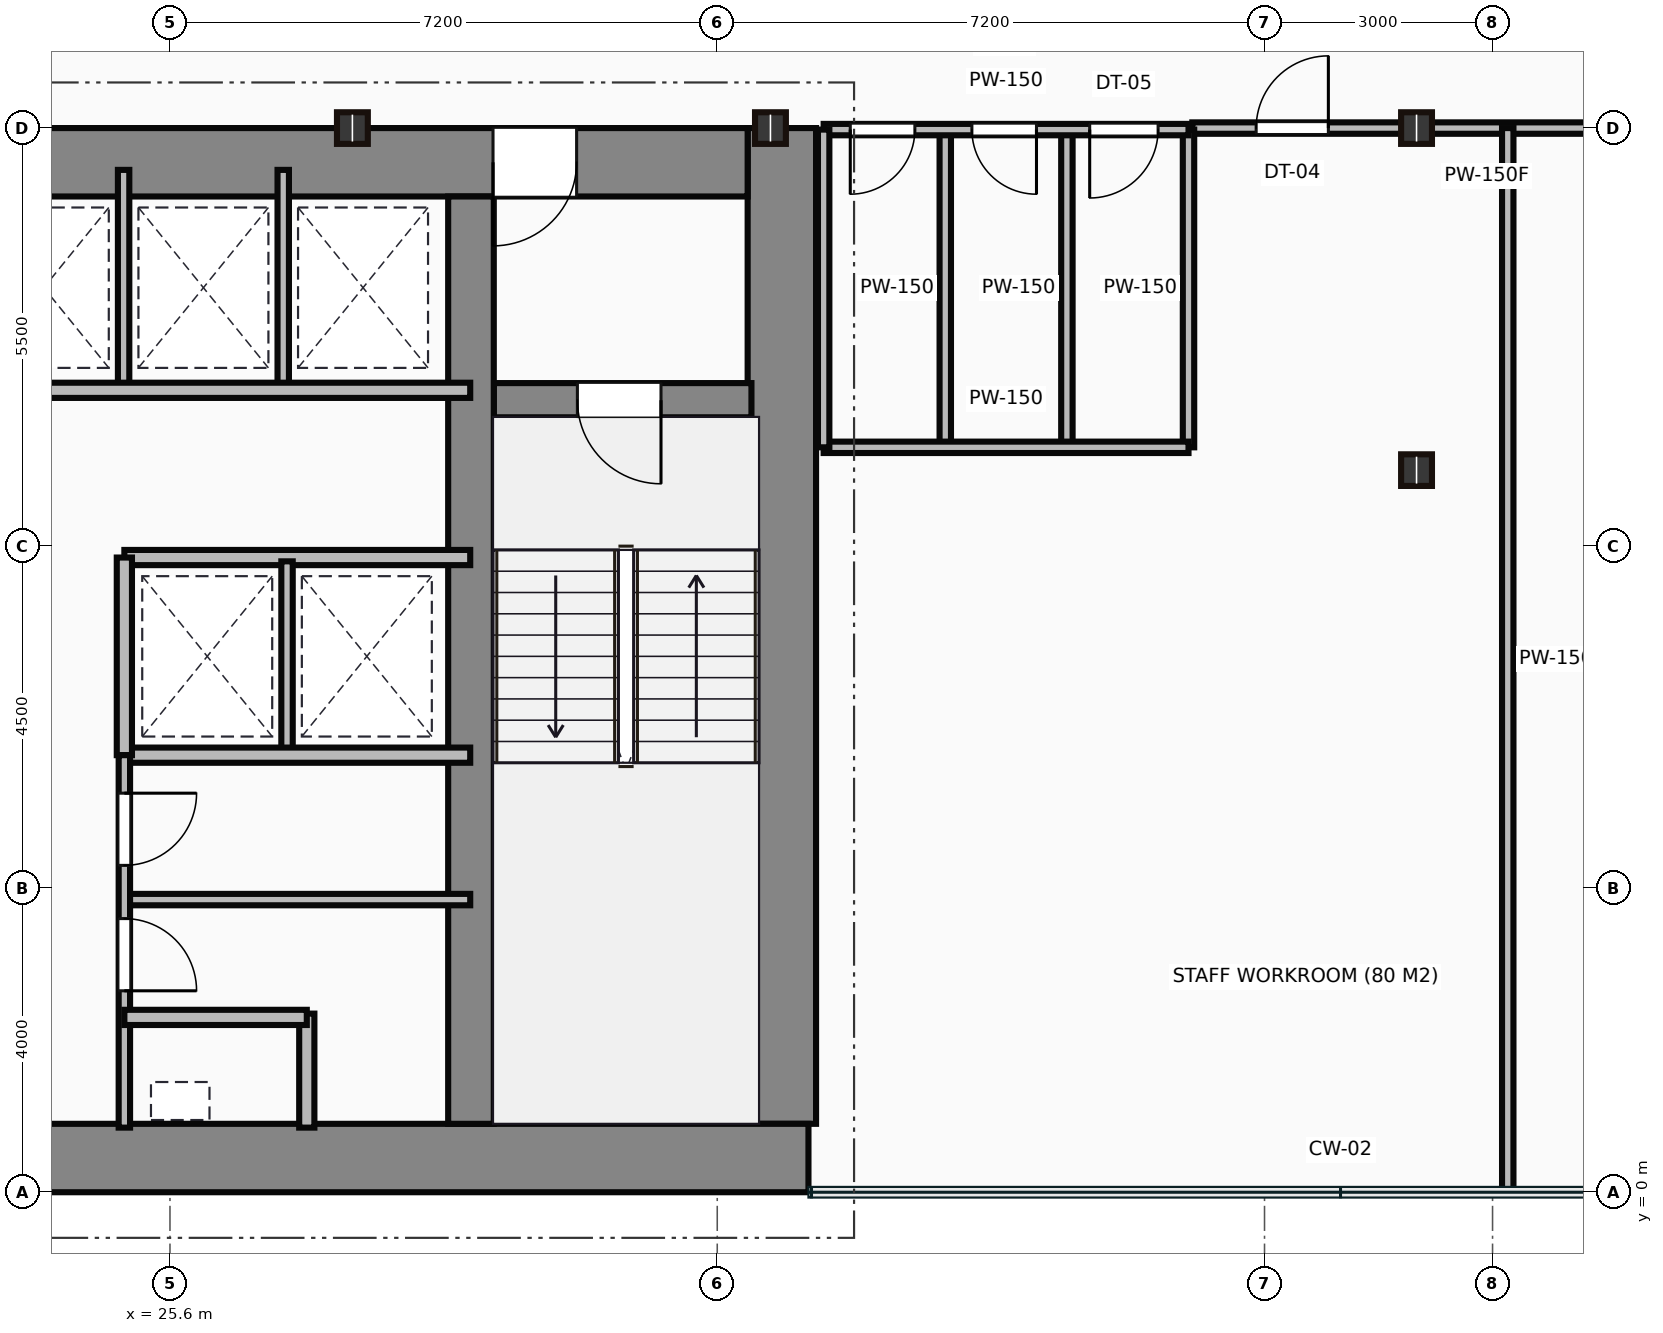
"""IFC4 building model, lengths in metres.
Left out: names, types, materials, properties, quantities, classifications, styles, units other than length and angle.
Written with IfcOpenShell. Run it as: python <this file> out.ifc"""

import sys

from ifc_helpers import new_model, si_unit, direction, frame, frame_2d, origin, origin_2d, place, context, subcontext, project, spatial, rectangle, i_section, extrude, source, transform, mapped, element, fill, save


model = new_model("IFC4")
c1 = context("Model", 3, precision=1e-05, world=origin(), true_north=direction((0.0, 1.0)))
c2 = subcontext(c1, "Body", "Model", "MODEL_VIEW")
j1 = project(units=[si_unit("LENGTHUNIT", "METRE"), si_unit("PLANEANGLEUNIT", "RADIAN")], contexts=[c1])
p1 = place(None, origin())
s1 = spatial("IfcSite", under=j1, at=p1, CompositionType="ELEMENT")
p2 = place(p1, origin())
s2 = spatial("IfcBuilding", under=s1, at=p2, CompositionType="ELEMENT")
p3 = place(p2, frame((0.0, 0.0, 76.3)))
s3 = spatial("IfcBuildingStorey", under=s2, at=p3, CompositionType="ELEMENT", Elevation=76.3)
m1 = source(origin(), c2, "Body", "SweptSolid", [
    extrude(rectangle(XDim=29.5, YDim=0.9, at=frame_2d((14.75, 0.0))), origin(), (0.0, 0.0, 1.0), 3.65),
])
p4 = place(p3, frame((4.5, 0.45, 0.0), z_axis=(0.0, 0.0, 1.0), x_axis=(1.0, 0.0, 0.0)))
e1 = element("IfcWall", 1, at=p4, inside=s3, PredefinedType="SHEAR", context=c2, shape_type="MappedRepresentation", body=[
    mapped(m1, transform((0.0, 0.0, 0.0))),
])
m2 = source(origin(), c2, "Body", "SweptSolid", [
    extrude(rectangle(XDim=13.1, YDim=0.9, at=frame_2d((6.55, 0.0))), origin(), (0.0, 0.0, 1.0), 3.65),
])
p5 = place(p3, frame((33.65, 0.9, 0.0), z_axis=(0.0, 0.0, 1.0), x_axis=(0.0, 1.0, 0.0)))
e2 = element("IfcWall", 2, at=p5, inside=s3, PredefinedType="SHEAR", context=c2, shape_type="MappedRepresentation", body=[
    mapped(m2, transform((0.0, 0.0, 0.0))),
])
m3 = source(origin(), c2, "Body", "SweptSolid", [
    extrude(rectangle(XDim=12.6, YDim=0.9, at=frame_2d((6.3, 0.0))), origin(), (0.0, 0.0, 1.0), 3.65),
])
p6 = place(p3, frame((20.6, 13.55, 0.0), z_axis=(0.0, 0.0, 1.0), x_axis=(1.0, 0.0, 0.0)))
e3 = element("IfcWall", 3, at=p6, inside=s3, PredefinedType="SHEAR", context=c2, shape_type="MappedRepresentation", body=[
    mapped(m3, transform((0.0, 0.0, 0.0))),
])
p7 = place(p6, frame((9.25, 0.0, 0.0)))
e4 = element("IfcOpeningElement", 4, at=p7, cuts=e3, PredefinedType="OPENING", context=c2, shape_type="SweptSolid", body=[
    extrude(rectangle(XDim=1.1, YDim=2.15, at=frame_2d((0.55, 1.075))), frame((0.0, 0.46, 0.0), z_axis=(0.0, -1.0, 0.0), x_axis=(1.0, 0.0, 0.0)), (0.0, 0.0, 1.0), 0.92),
])
m4 = source(origin(), c2, "Body", "SweptSolid", [
    extrude(rectangle(XDim=12.2, YDim=0.6, at=frame_2d((6.1, 0.0))), origin(), (0.0, 0.0, 1.0), 3.65),
])
p8 = place(p3, frame((29.56, 0.9, 0.0), z_axis=(0.0, 0.0, 1.0), x_axis=(0.0, 1.0, 0.0)))
e5 = element("IfcWall", 5, at=p8, inside=s3, PredefinedType="SHEAR", context=c2, shape_type="MappedRepresentation", body=[
    mapped(m4, transform((0.0, 0.0, 0.0))),
])
m5 = source(origin(), c2, "Body", "SweptSolid", [
    extrude(rectangle(XDim=3.39, YDim=0.45, at=frame_2d((1.695, 0.0))), origin(), (0.0, 0.0, 1.0), 3.65),
])
p9 = place(p3, frame((29.86, 10.42, 0.0), z_axis=(0.0, 0.0, 1.0), x_axis=(1.0, 0.0, 0.0)))
e6 = element("IfcWall", 6, at=p9, inside=s3, PredefinedType="SHEAR", context=c2, shape_type="MappedRepresentation", body=[
    mapped(m5, transform((0.0, 0.0, 0.0))),
])
p10 = place(p9, frame((1.1, 0.0, 0.0)))
e7 = element("IfcOpeningElement", 7, at=p10, cuts=e6, PredefinedType="OPENING", context=c2, shape_type="SweptSolid", body=[
    extrude(rectangle(XDim=1.1, YDim=2.15, at=frame_2d((0.55, 1.075))), frame((0.0, 0.235, 0.0), z_axis=(0.0, -1.0, 0.0), x_axis=(1.0, 0.0, 0.0)), (0.0, 0.0, 1.0), 0.47),
])
m6 = source(origin(), c2, "Body", "SweptSolid", [
    extrude(i_section(OverallWidth=0.406, OverallDepth=0.416, WebThickness=0.03, FlangeThickness=0.048, at=origin_2d()), origin(), (0.0, 0.0, 1.0), 3.65),
])
for number, where, z_axis, x_axis in (
    (8, (28.0, 14.0, 0.0), (0.0, 0.0, 1.0), (1.0, 0.0, 0.0)),
    (9, (33.5, 14.0, 0.0), (0.0, 0.0, 1.0), (1.0, 0.0, 0.0)),
    (10, (42.0, 9.5, 0.0), (0.0, 0.0, 1.0), (1.0, 0.0, 0.0)),
    (11, (42.0, 14.0, 0.0), (0.0, 0.0, 1.0), (1.0, 0.0, 0.0)),
):
    element("IfcColumn", number, at=place(p3, frame(where, z_axis=z_axis, x_axis=x_axis)), inside=s3, PredefinedType="COLUMN", context=c2, shape_type="MappedRepresentation", body=[
        mapped(m6, transform((0.0, 0.0, 0.0))),
    ])
m7 = source(origin(), c2, "Body", "SweptSolid", [
    extrude(rectangle(XDim=8.8, YDim=0.2, at=frame_2d((4.4, 0.0))), origin(), (0.0, 0.0, 1.0), 3.4),
])
p11 = place(p3, frame((20.75, 10.55, 0.0), z_axis=(0.0, 0.0, 1.0), x_axis=(1.0, 0.0, 0.0)))
e12 = element("IfcWall", 12, at=p11, inside=s3, PredefinedType="PARTITIONING", context=c2, shape_type="MappedRepresentation", body=[
    mapped(m7, transform((0.0, 0.0, 0.0))),
])
m8 = source(origin(), c2, "Body", "SweptSolid", [
    extrude(rectangle(XDim=2.85, YDim=0.15, at=frame_2d((1.425, 0.0))), origin(), (0.0, 0.0, 1.0), 3.4),
])
for number, where, z_axis, x_axis in (
    (13, (24.99, 10.6, 0.0), (0.0, 0.0, 1.0), (0.0, 1.0, 0.0)),
    (14, (27.09, 10.6, 0.0), (0.0, 0.0, 1.0), (0.0, 1.0, 0.0)),
):
    element("IfcWall", number, at=place(p3, frame(where, z_axis=z_axis, x_axis=x_axis)), inside=s3, PredefinedType="PARTITIONING", context=c2, shape_type="MappedRepresentation", body=[
        mapped(m8, transform((0.0, 0.0, 0.0))),
    ])
m9 = source(origin(), c2, "Body", "SweptSolid", [
    extrude(rectangle(XDim=4.55, YDim=0.2, at=frame_2d((2.275, 0.0))), origin(), (0.0, 0.0, 1.0), 3.4),
])
for number, where, z_axis, x_axis in (
    (15, (25.0, 8.35, 0.0), (0.0, 0.0, 1.0), (1.0, 0.0, 0.0)),
    (16, (25.0, 5.75, 0.0), (0.0, 0.0, 1.0), (1.0, 0.0, 0.0)),
):
    element("IfcWall", number, at=place(p3, frame(where, z_axis=z_axis, x_axis=x_axis)), inside=s3, PredefinedType="PARTITIONING", context=c2, shape_type="MappedRepresentation", body=[
        mapped(m9, transform((0.0, 0.0, 0.0))),
    ])
m10 = source(origin(), c2, "Body", "SweptSolid", [
    extrude(rectangle(XDim=2.6, YDim=0.2, at=frame_2d((1.3, 0.0))), origin(), (0.0, 0.0, 1.0), 3.4),
])
p12 = place(p3, frame((25.0, 5.75, 0.0), z_axis=(0.0, 0.0, 1.0), x_axis=(0.0, 1.0, 0.0)))
e17 = element("IfcWall", 17, at=p12, inside=s3, PredefinedType="PARTITIONING", context=c2, shape_type="MappedRepresentation", body=[
    mapped(m10, transform((0.0, 0.0, 0.0))),
])
m11 = source(origin(), c2, "Body", "SweptSolid", [
    extrude(rectangle(XDim=2.5, YDim=0.15, at=frame_2d((1.25, 0.0))), origin(), (0.0, 0.0, 1.0), 3.4),
])
p13 = place(p3, frame((27.14, 5.8, 0.0), z_axis=(0.0, 0.0, 1.0), x_axis=(0.0, 1.0, 0.0)))
e18 = element("IfcWall", 18, at=p13, inside=s3, PredefinedType="PARTITIONING", context=c2, shape_type="MappedRepresentation", body=[
    mapped(m11, transform((0.0, 0.0, 0.0))),
])
m12 = source(origin(), c2, "Body", "SweptSolid", [
    extrude(rectangle(XDim=4.9, YDim=0.15, at=frame_2d((2.45, 0.0))), origin(), (0.0, 0.0, 1.0), 3.4),
])
p14 = place(p3, frame((25.0, 0.85, 0.0), z_axis=(0.0, 0.0, 1.0), x_axis=(0.0, 1.0, 0.0)))
e19 = element("IfcWall", 19, at=p14, inside=s3, PredefinedType="PARTITIONING", context=c2, shape_type="MappedRepresentation", body=[
    mapped(m12, transform((0.0, 0.0, 0.0))),
])
p15 = place(p14, frame((1.8, 0.0, 0.0)))
e20 = element("IfcOpeningElement", 20, at=p15, cuts=e19, PredefinedType="OPENING", context=c2, shape_type="SweptSolid", body=[
    extrude(rectangle(XDim=0.95, YDim=2.15, at=frame_2d((0.475, 1.075))), frame((0.0, 0.085, 0.0), z_axis=(0.0, -1.0, 0.0), x_axis=(1.0, 0.0, 0.0)), (0.0, 0.0, 1.0), 0.17),
])
p16 = place(p14, frame((3.45, 0.0, 0.0)))
e21 = element("IfcOpeningElement", 21, at=p16, cuts=e19, PredefinedType="OPENING", context=c2, shape_type="SweptSolid", body=[
    extrude(rectangle(XDim=0.95, YDim=2.15, at=frame_2d((0.475, 1.075))), frame((0.0, 0.085, 0.0), z_axis=(0.0, -1.0, 0.0), x_axis=(1.0, 0.0, 0.0)), (0.0, 0.0, 1.0), 0.17),
])
m13 = source(origin(), c2, "Body", "SweptSolid", [
    extrude(rectangle(XDim=2.4, YDim=0.2, at=frame_2d((1.2, 0.0))), origin(), (0.0, 0.0, 1.0), 3.4),
])
p17 = place(p3, frame((25.0, 2.3, 0.0), z_axis=(0.0, 0.0, 1.0), x_axis=(1.0, 0.0, 0.0)))
e22 = element("IfcWall", 22, at=p17, inside=s3, PredefinedType="PARTITIONING", context=c2, shape_type="MappedRepresentation", body=[
    mapped(m13, transform((0.0, 0.0, 0.0))),
])
m14 = source(origin(), c2, "Body", "SweptSolid", [
    extrude(rectangle(XDim=1.5, YDim=0.2, at=frame_2d((0.75, 0.0))), origin(), (0.0, 0.0, 1.0), 3.4),
])
p18 = place(p3, frame((27.4, 0.85, 0.0), z_axis=(0.0, 0.0, 1.0), x_axis=(0.0, 1.0, 0.0)))
e23 = element("IfcWall", 23, at=p18, inside=s3, PredefinedType="PARTITIONING", context=c2, shape_type="MappedRepresentation", body=[
    mapped(m14, transform((0.0, 0.0, 0.0))),
])
m15 = source(origin(), c2, "Body", "SweptSolid", [
    extrude(rectangle(XDim=4.55, YDim=0.15, at=frame_2d((2.275, 0.0))), origin(), (0.0, 0.0, 1.0), 3.4),
])
p19 = place(p3, frame((25.0, 3.85, 0.0), z_axis=(0.0, 0.0, 1.0), x_axis=(1.0, 0.0, 0.0)))
e24 = element("IfcWall", 24, at=p19, inside=s3, PredefinedType="PARTITIONING", context=c2, shape_type="MappedRepresentation", body=[
    mapped(m15, transform((0.0, 0.0, 0.0))),
])
m16 = source(origin(), c2, "Body", "SweptSolid", [
    extrude(rectangle(XDim=4.8, YDim=0.15, at=frame_2d((2.4, 0.0))), origin(), (0.0, 0.0, 1.0), 2.625),
])
p20 = place(p3, frame((34.2, 13.98, 0.0), z_axis=(0.0, 0.0, 1.0), x_axis=(1.0, 0.0, 0.0)))
e25 = element("IfcWall", 25, at=p20, inside=s3, PredefinedType="PARTITIONING", context=c2, shape_type="MappedRepresentation", body=[
    mapped(m16, transform((0.0, 0.0, 0.0))),
])
p21 = place(p20, frame((0.35, 0.0, 0.0)))
e26 = element("IfcOpeningElement", 26, at=p21, cuts=e25, PredefinedType="OPENING", context=c2, shape_type="SweptSolid", body=[
    extrude(rectangle(XDim=0.85, YDim=2.1, at=frame_2d((0.425, 1.05))), frame((0.0, 0.085, 0.0), z_axis=(0.0, -1.0, 0.0), x_axis=(1.0, 0.0, 0.0)), (0.0, 0.0, 1.0), 0.17),
])
p22 = place(p20, frame((1.95, 0.0, 0.0)))
e27 = element("IfcOpeningElement", 27, at=p22, cuts=e25, PredefinedType="OPENING", context=c2, shape_type="SweptSolid", body=[
    extrude(rectangle(XDim=0.85, YDim=2.1, at=frame_2d((0.425, 1.05))), frame((0.0, 0.085, 0.0), z_axis=(0.0, -1.0, 0.0), x_axis=(1.0, 0.0, 0.0)), (0.0, 0.0, 1.0), 0.17),
])
p23 = place(p20, frame((3.5, 0.0, 0.0)))
e28 = element("IfcOpeningElement", 28, at=p23, cuts=e25, PredefinedType="OPENING", context=c2, shape_type="SweptSolid", body=[
    extrude(rectangle(XDim=0.9, YDim=2.1, at=frame_2d((0.45, 1.05))), frame((0.0, 0.085, 0.0), z_axis=(0.0, -1.0, 0.0), x_axis=(1.0, 0.0, 0.0)), (0.0, 0.0, 1.0), 0.17),
])
m17 = source(origin(), c2, "Body", "SweptSolid", [
    extrude(rectangle(XDim=4.8, YDim=0.15, at=frame_2d((2.4, 0.0))), origin(), (0.0, 0.0, 1.0), 3.4),
])
p24 = place(p3, frame((34.2, 9.8, 0.0), z_axis=(0.0, 0.0, 1.0), x_axis=(1.0, 0.0, 0.0)))
e29 = element("IfcWall", 29, at=p24, inside=s3, PredefinedType="PARTITIONING", context=c2, shape_type="MappedRepresentation", body=[
    mapped(m17, transform((0.0, 0.0, 0.0))),
])
m18 = source(origin(), c2, "Body", "SweptSolid", [
    extrude(rectangle(XDim=4.18, YDim=0.15, at=frame_2d((2.09, 0.0))), origin(), (0.0, 0.0, 1.0), 3.4),
])
for number, where, z_axis, x_axis in (
    (30, (39.0, 9.8, 0.0), (0.0, 0.0, 1.0), (0.0, 1.0, 0.0)),
    (31, (34.2, 9.8, 0.0), (0.0, 0.0, 1.0), (0.0, 1.0, 0.0)),
    (32, (35.8, 9.8, 0.0), (0.0, 0.0, 1.0), (0.0, 1.0, 0.0)),
    (33, (37.4, 9.8, 0.0), (0.0, 0.0, 1.0), (0.0, 1.0, 0.0)),
):
    element("IfcWall", number, at=place(p3, frame(where, z_axis=z_axis, x_axis=x_axis)), inside=s3, PredefinedType="PARTITIONING", context=c2, shape_type="MappedRepresentation", body=[
        mapped(m18, transform((0.0, 0.0, 0.0))),
    ])
m19 = source(origin(), c2, "Body", "SweptSolid", [
    extrude(rectangle(XDim=7.75, YDim=0.15, at=frame_2d((3.875, 0.0))), origin(), (0.0, 0.0, 1.0), 2.625),
])
p25 = place(p3, frame((46.8, 14.0, 0.0), z_axis=(0.0, 0.0, 1.0), x_axis=(-1.0, 0.0, 0.0)))
e34 = element("IfcWall", 34, at=p25, inside=s3, PredefinedType="PARTITIONING", context=c2, shape_type="MappedRepresentation", body=[
    mapped(m19, transform((0.0, 0.0, 0.0))),
])
p26 = place(p25, frame((5.96, 0.0, 0.0)))
e35 = element("IfcOpeningElement", 35, at=p26, cuts=e34, PredefinedType="OPENING", context=c2, shape_type="SweptSolid", body=[
    extrude(rectangle(XDim=0.95, YDim=2.15, at=frame_2d((0.475, 1.075))), frame((0.0, 0.085, 0.0), z_axis=(0.0, -1.0, 0.0), x_axis=(1.0, 0.0, 0.0)), (0.0, 0.0, 1.0), 0.17),
])
p27 = place(p25, frame((1.455, 0.0, 0.0)))
e36 = element("IfcOpeningElement", 36, at=p27, cuts=e34, PredefinedType="OPENING", context=c2, shape_type="SweptSolid", body=[
    extrude(rectangle(XDim=0.95, YDim=2.15, at=frame_2d((0.475, 1.075))), frame((0.0, 0.085, 0.0), z_axis=(0.0, -1.0, 0.0), x_axis=(1.0, 0.0, 0.0)), (0.0, 0.0, 1.0), 0.17),
])
m20 = source(origin(), c2, "Body", "SweptSolid", [
    extrude(rectangle(XDim=13.98, YDim=0.15, at=frame_2d((6.99, 0.0))), origin(), (0.0, 0.0, 1.0), 3.4),
])
p28 = place(p3, frame((43.2, 14.0, 0.0), z_axis=(0.0, 0.0, 1.0), x_axis=(0.0, -1.0, 0.0)))
e37 = element("IfcWall", 37, at=p28, inside=s3, PredefinedType="PARTITIONING", context=c2, shape_type="MappedRepresentation", body=[
    mapped(m20, transform((0.0, 0.0, 0.0))),
])
m21 = source(origin(), c2, "Body", "SweptSolid", [
    extrude(rectangle(XDim=1.1, YDim=2.15, at=frame_2d((0.55, 1.075))), frame((0.0, 0.025, 0.0), z_axis=(0.0, -1.0, 0.0), x_axis=(1.0, 0.0, 0.0)), (0.0, 0.0, 1.0), 0.05),
])
p29 = place(p10, frame((1.1, 0.0, 0.0), z_axis=(0.0, 0.0, 1.0), x_axis=(-1.0, 0.0, 0.0)))
e38 = element("IfcDoor", 38, at=p29, inside=s3, OperationType="SINGLE_SWING_RIGHT", PredefinedType="DOOR", context=c2, shape_type="MappedRepresentation", body=[
    mapped(m21, transform((0.0, 0.0, 0.0))),
])
fill(e7, e38)
p30 = place(p7, origin())
e39 = element("IfcDoor", 39, at=p30, inside=s3, OperationType="SINGLE_SWING_LEFT", PredefinedType="DOOR", context=c2, shape_type="MappedRepresentation", body=[
    mapped(m21, transform((0.0, 0.0, 0.0))),
])
fill(e4, e39)
m22 = source(origin(), c2, "Body", "SweptSolid", [
    extrude(rectangle(XDim=0.95, YDim=2.15, at=frame_2d((0.475, 1.075))), frame((0.0, 0.025, 0.0), z_axis=(0.0, -1.0, 0.0), x_axis=(1.0, 0.0, 0.0)), (0.0, 0.0, 1.0), 0.05),
])
p31 = place(p15, origin())
e40 = element("IfcDoor", 40, at=p31, inside=s3, OperationType="SINGLE_SWING_LEFT", PredefinedType="DOOR", context=c2, shape_type="MappedRepresentation", body=[
    mapped(m22, transform((0.0, 0.0, 0.0))),
])
fill(e20, e40)
p32 = place(p16, origin())
e41 = element("IfcDoor", 41, at=p32, inside=s3, OperationType="SINGLE_SWING_RIGHT", PredefinedType="DOOR", context=c2, shape_type="MappedRepresentation", body=[
    mapped(m22, transform((0.0, 0.0, 0.0))),
])
fill(e21, e41)
m23 = source(origin(), c2, "Body", "SweptSolid", [
    extrude(rectangle(XDim=0.85, YDim=2.1, at=frame_2d((0.425, 1.05))), frame((0.0, 0.025, 0.0), z_axis=(0.0, -1.0, 0.0), x_axis=(1.0, 0.0, 0.0)), (0.0, 0.0, 1.0), 0.05),
])
p33 = place(p21, frame((0.85, 0.0, 0.0), z_axis=(0.0, 0.0, 1.0), x_axis=(-1.0, 0.0, 0.0)))
e42 = element("IfcDoor", 42, at=p33, inside=s3, OperationType="SINGLE_SWING_LEFT", PredefinedType="DOOR", context=c2, shape_type="MappedRepresentation", body=[
    mapped(m23, transform((0.0, 0.0, 0.0))),
])
fill(e26, e42)
p34 = place(p22, frame((0.85, 0.0, 0.0), z_axis=(0.0, 0.0, 1.0), x_axis=(-1.0, 0.0, 0.0)))
e43 = element("IfcDoor", 43, at=p34, inside=s3, OperationType="SINGLE_SWING_RIGHT", PredefinedType="DOOR", context=c2, shape_type="MappedRepresentation", body=[
    mapped(m23, transform((0.0, 0.0, 0.0))),
])
fill(e27, e43)
m24 = source(origin(), c2, "Body", "SweptSolid", [
    extrude(rectangle(XDim=0.9, YDim=2.1, at=frame_2d((0.45, 1.05))), frame((0.0, 0.025, 0.0), z_axis=(0.0, -1.0, 0.0), x_axis=(1.0, 0.0, 0.0)), (0.0, 0.0, 1.0), 0.05),
])
p35 = place(p23, frame((0.9, 0.0, 0.0), z_axis=(0.0, 0.0, 1.0), x_axis=(-1.0, 0.0, 0.0)))
e44 = element("IfcDoor", 44, at=p35, inside=s3, OperationType="SINGLE_SWING_LEFT", PredefinedType="DOOR", context=c2, shape_type="MappedRepresentation", body=[
    mapped(m24, transform((0.0, 0.0, 0.0))),
])
fill(e28, e44)
p36 = place(p26, origin())
e45 = element("IfcDoor", 45, at=p36, inside=s3, OperationType="SINGLE_SWING_LEFT", PredefinedType="DOOR", context=c2, shape_type="MappedRepresentation", body=[
    mapped(m22, transform((0.0, 0.0, 0.0))),
])
fill(e35, e45)
save(model, sys.argv[1])
